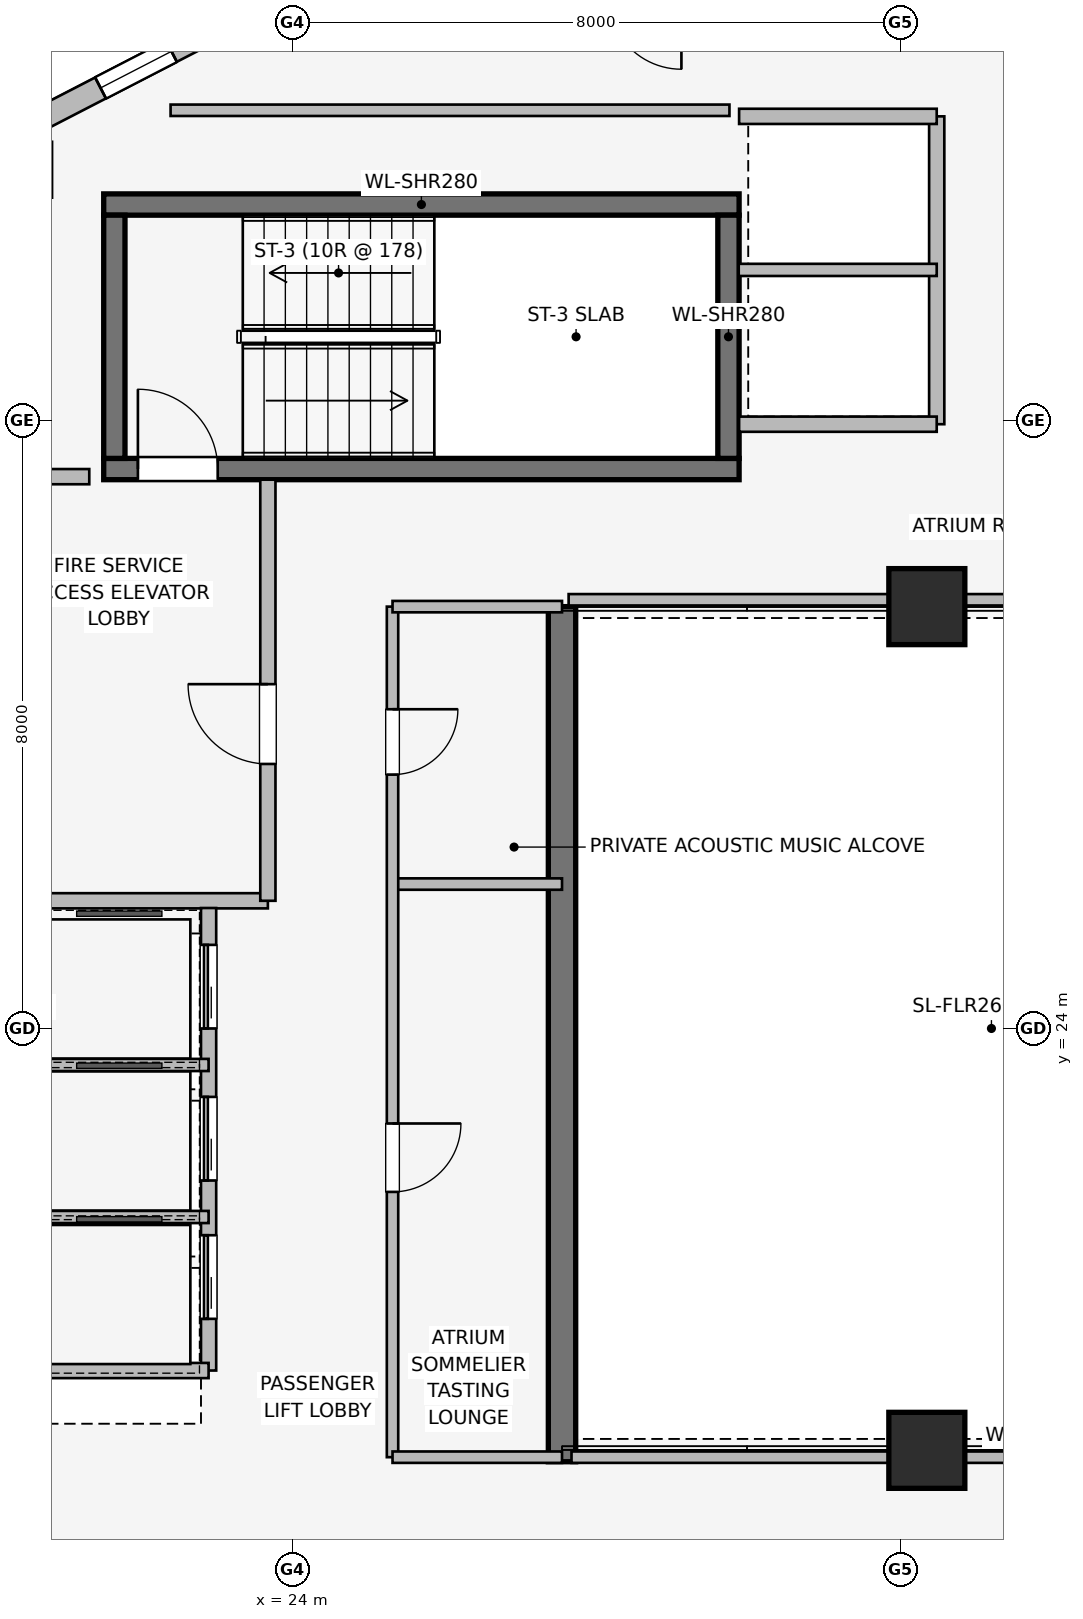
"""IFC4 building model, lengths in metres.
Left out: names, types, materials, properties, quantities, classifications, styles, units other than length and angle.
Written with IfcOpenShell. Run it as: python <this file> out.ifc"""

import sys

from ifc_helpers import new_model, si_unit, direction, frame, frame_2d, origin, origin_2d, place, context, subcontext, project, spatial, rectangle, extrude, element, fill, save


model = new_model("IFC4")
c1 = context("Model", 3, precision=1e-05, world=origin(), true_north=direction((0.0, 1.0)))
c2 = subcontext(c1, "Body", "Model", "MODEL_VIEW")
j1 = project(units=[si_unit("LENGTHUNIT", "METRE"), si_unit("PLANEANGLEUNIT", "RADIAN")], contexts=[c1])
p1 = place(None, origin())
s1 = spatial("IfcSite", under=j1, at=p1, CompositionType="ELEMENT")
p2 = place(p1, origin())
s2 = spatial("IfcBuilding", under=s1, at=p2, CompositionType="ELEMENT")
p3 = place(p2, frame((0.0, 0.0, 252.55)))
s3 = spatial("IfcBuildingStorey", under=s2, at=p3, CompositionType="ELEMENT", Elevation=252.55)
p4 = place(p3, frame((27.55, 29.55, 0.0), z_axis=(0.0, 0.0, 1.0), x_axis=(0.0, -1.0, 0.0)))
e1 = element("IfcWall", 1, at=p4, inside=s3, PredefinedType="SHEAR", context=c2, shape_type="SweptSolid", body=[
    extrude(rectangle(XDim=11.25, YDim=0.36, at=frame_2d((5.625, 0.0))), origin(), (0.0, 0.0, 1.0), 3.55),
])
p5 = place(p3, frame((21.52, 31.36, 0.0), z_axis=(0.0, 0.0, 1.0), x_axis=(1.0, 0.0, 0.0)))
e2 = element("IfcWall", 2, at=p5, inside=s3, PredefinedType="SHEAR", context=c2, shape_type="SweptSolid", body=[
    extrude(rectangle(XDim=8.36, YDim=0.28, at=frame_2d((4.18, 0.0))), origin(), (0.0, 0.0, 1.0), 3.55),
])
p6 = place(p5, frame((0.45, 0.0, 0.0)))
e3 = element("IfcOpeningElement", 3, at=p6, cuts=e2, PredefinedType="OPENING", context=c2, shape_type="SweptSolid", body=[
    extrude(rectangle(XDim=1.05, YDim=2.0, at=frame_2d((0.525, 1.0))), frame((0.0, 0.15, 0.0), z_axis=(0.0, -1.0, 0.0), x_axis=(1.0, 0.0, 0.0)), (0.0, 0.0, 1.0), 0.3),
])
p7 = place(p3, frame((29.88, 34.84, 0.0), z_axis=(0.0, 0.0, 1.0), x_axis=(-1.0, 0.0, 0.0)))
e4 = element("IfcWall", 4, at=p7, inside=s3, PredefinedType="SHEAR", context=c2, shape_type="SweptSolid", body=[
    extrude(rectangle(XDim=8.36, YDim=0.28, at=frame_2d((4.18, 0.0))), origin(), (0.0, 0.0, 1.0), 3.55),
])
for number, where, z_axis, x_axis in (
    (5, (21.66, 34.7, 0.0), (0.0, 0.0, 1.0), (0.0, -1.0, 0.0)),
    (6, (29.74, 31.5, 0.0), (0.0, 0.0, 1.0), (0.0, 1.0, 0.0)),
):
    element("IfcWall", number, at=place(p3, frame(where, z_axis=z_axis, x_axis=x_axis)), inside=s3, PredefinedType="SHEAR", context=c2, shape_type="SweptSolid", body=[
        extrude(rectangle(XDim=3.2, YDim=0.28, at=frame_2d((1.6, 0.0))), origin(), (0.0, 0.0, 1.0), 3.55),
    ])
for number, where, z_axis, x_axis in (
    (7, (32.35, 18.45, 0.0), (0.0, 0.0, 1.0), (1.0, 0.0, 0.0)),
    (8, (32.35, 29.55, 0.0), (0.0, 0.0, 1.0), (1.0, 0.0, 0.0)),
):
    element("IfcColumn", number, at=place(p3, frame(where, z_axis=z_axis, x_axis=x_axis)), inside=s3, PredefinedType="COLUMN", context=c2, shape_type="SweptSolid", body=[
        extrude(rectangle(XDim=1.0, YDim=1.0, at=origin_2d()), origin(), (0.0, 0.0, 1.0), 3.55),
    ])
p8 = place(p3, frame((17.566, 34.354, 0.0), z_axis=(0.0, 0.0, 1.0), x_axis=(0.888581481622, 0.458718814218, 0.0)))
e9 = element("IfcWall", 9, at=p8, inside=s3, PredefinedType="STANDARD", context=c2, shape_type="SweptSolid", body=[
    extrude(rectangle(XDim=15.077, YDim=0.31, at=frame_2d((7.539, 0.0))), origin(), (0.0, 0.0, 1.0), 3.29),
])
p9 = place(p8, frame((0.998, 0.0, 0.75)))
e10 = element("IfcOpeningElement", 10, at=p9, cuts=e9, PredefinedType="OPENING", context=c2, shape_type="SweptSolid", body=[
    extrude(rectangle(XDim=1.05, YDim=1.4, at=frame_2d((0.525, 0.7))), frame((0.0, 0.165, 0.0), z_axis=(0.0, -1.0, 0.0), x_axis=(1.0, 0.0, 0.0)), (0.0, 0.0, 1.0), 0.33),
])
p10 = place(p8, frame((4.403, 0.0, 0.75)))
e11 = element("IfcOpeningElement", 11, at=p10, cuts=e9, PredefinedType="OPENING", context=c2, shape_type="SweptSolid", body=[
    extrude(rectangle(XDim=1.05, YDim=1.4, at=frame_2d((0.525, 0.7))), frame((0.0, 0.165, 0.0), z_axis=(0.0, -1.0, 0.0), x_axis=(1.0, 0.0, 0.0)), (0.0, 0.0, 1.0), 0.33),
])
p11 = place(p8, frame((8.086, 0.0, 0.75)))
e12 = element("IfcOpeningElement", 12, at=p11, cuts=e9, PredefinedType="OPENING", context=c2, shape_type="SweptSolid", body=[
    extrude(rectangle(XDim=2.4, YDim=1.6, at=frame_2d((1.2, 0.8))), frame((0.0, 0.165, 0.0), z_axis=(0.0, -1.0, 0.0), x_axis=(1.0, 0.0, 0.0)), (0.0, 0.0, 1.0), 0.33),
])
p12 = place(p8, frame((13.029, 0.0, 0.75)))
e13 = element("IfcOpeningElement", 13, at=p12, cuts=e9, PredefinedType="OPENING", context=c2, shape_type="SweptSolid", body=[
    extrude(rectangle(XDim=1.05, YDim=1.4, at=frame_2d((0.525, 0.7))), frame((0.0, 0.165, 0.0), z_axis=(0.0, -1.0, 0.0), x_axis=(1.0, 0.0, 0.0)), (0.0, 0.0, 1.0), 0.33),
])
p13 = place(p3, frame((20.793, 25.68, 0.0), z_axis=(0.0, 0.0, 1.0), x_axis=(1.0, 0.0, 0.0)))
e14 = element("IfcWall", 14, at=p13, inside=s3, PredefinedType="PARTITIONING", context=c2, shape_type="SweptSolid", body=[
    extrude(rectangle(XDim=2.887, YDim=0.2, at=frame_2d((1.443, 0.0))), origin(), (0.0, 0.0, 1.0), 3.29),
])
p14 = place(p3, frame((23.68, 25.68, 0.0), z_axis=(0.0, 0.0, 1.0), x_axis=(0.0, 1.0, 0.0)))
e15 = element("IfcWall", 15, at=p14, inside=s3, PredefinedType="PARTITIONING", context=c2, shape_type="SweptSolid", body=[
    extrude(rectangle(XDim=5.54, YDim=0.2, at=frame_2d((2.77, 0.0))), origin(), (0.0, 0.0, 1.0), 3.29),
])
p15 = place(p14, frame((1.8, 0.0, 0.0)))
e16 = element("IfcOpeningElement", 16, at=p15, cuts=e15, PredefinedType="OPENING", context=c2, shape_type="SweptSolid", body=[
    extrude(rectangle(XDim=1.05, YDim=2.0, at=frame_2d((0.525, 1.0))), frame((0.0, 0.11, 0.0), z_axis=(0.0, -1.0, 0.0), x_axis=(1.0, 0.0, 0.0)), (0.0, 0.0, 1.0), 0.22),
])
p16 = place(p3, frame((21.33, 31.26, 0.0), z_axis=(0.0, 0.0, 1.0), x_axis=(-1.0, 0.0, 0.0)))
e17 = element("IfcWall", 17, at=p16, inside=s3, PredefinedType="PARTITIONING", context=c2, shape_type="SweptSolid", body=[
    extrude(rectangle(XDim=1.68, YDim=0.2, at=frame_2d((0.84, 0.0))), origin(), (0.0, 0.0, 1.0), 3.29),
])
p17 = place(p3, frame((32.48, 31.95, 0.0), z_axis=(0.0, 0.0, 1.0), x_axis=(0.0, 1.0, 0.0)))
e18 = element("IfcWall", 18, at=p17, inside=s3, PredefinedType="PARTITIONING", context=c2, shape_type="SweptSolid", body=[
    extrude(rectangle(XDim=4.05, YDim=0.2, at=frame_2d((2.025, 0.0))), origin(), (0.0, 0.0, 1.0), 3.29),
])
for number, where, z_axis, x_axis in (
    (19, (29.88, 36.0, 0.0), (0.0, 0.0, 1.0), (1.0, 0.0, 0.0)),
    (20, (32.48, 31.95, 0.0), (0.0, 0.0, 1.0), (-1.0, 0.0, 0.0)),
):
    element("IfcWall", number, at=place(p3, frame(where, z_axis=z_axis, x_axis=x_axis)), inside=s3, PredefinedType="PARTITIONING", context=c2, shape_type="SweptSolid", body=[
        extrude(rectangle(XDim=2.6, YDim=0.2, at=frame_2d((1.3, 0.0))), origin(), (0.0, 0.0, 1.0), 3.29),
    ])
p18 = place(p3, frame((29.875, 33.98, 0.0), z_axis=(0.0, 0.0, 1.0), x_axis=(1.0, 0.0, 0.0)))
e21 = element("IfcWall", 21, at=p18, inside=s3, PredefinedType="PARTITIONING", context=c2, shape_type="SweptSolid", body=[
    extrude(rectangle(XDim=2.605, YDim=0.16, at=frame_2d((1.302, 0.0))), origin(), (0.0, 0.0, 1.0), 3.29),
])
p19 = place(p3, frame((22.9, 19.5, 0.0), z_axis=(0.0, 0.0, 1.0), x_axis=(0.0, 1.0, 0.0)))
e22 = element("IfcWall", 22, at=p19, inside=s3, PredefinedType="PARTITIONING", context=c2, shape_type="SweptSolid", body=[
    extrude(rectangle(XDim=6.085, YDim=0.2, at=frame_2d((3.042, 0.0))), origin(), (0.0, 0.0, 1.0), 3.29),
])
p20 = place(p19, frame((0.68, 0.0, 0.0)))
e23 = element("IfcOpeningElement", 23, at=p20, cuts=e22, PredefinedType="OPENING", context=c2, shape_type="SweptSolid", body=[
    extrude(rectangle(XDim=1.1, YDim=2.2, at=frame_2d((0.55, 1.1))), frame((0.0, 0.11, 0.0), z_axis=(0.0, -1.0, 0.0), x_axis=(1.0, 0.0, 0.0)), (0.0, 0.0, 1.0), 0.22),
])
p21 = place(p19, frame((2.5, 0.0, 0.0)))
e24 = element("IfcOpeningElement", 24, at=p21, cuts=e22, PredefinedType="OPENING", context=c2, shape_type="SweptSolid", body=[
    extrude(rectangle(XDim=1.1, YDim=2.2, at=frame_2d((0.55, 1.1))), frame((0.0, 0.11, 0.0), z_axis=(0.0, -1.0, 0.0), x_axis=(1.0, 0.0, 0.0)), (0.0, 0.0, 1.0), 0.22),
])
p22 = place(p19, frame((4.5, 0.0, 0.0)))
e25 = element("IfcOpeningElement", 25, at=p22, cuts=e22, PredefinedType="OPENING", context=c2, shape_type="SweptSolid", body=[
    extrude(rectangle(XDim=1.1, YDim=2.2, at=frame_2d((0.55, 1.1))), frame((0.0, 0.11, 0.0), z_axis=(0.0, -1.0, 0.0), x_axis=(1.0, 0.0, 0.0)), (0.0, 0.0, 1.0), 0.22),
])
p23 = place(p3, frame((20.49, 19.5, 0.0), z_axis=(0.0, 0.0, 1.0), x_axis=(1.0, 0.0, 0.0)))
e26 = element("IfcWall", 26, at=p23, inside=s3, PredefinedType="PARTITIONING", context=c2, shape_type="SweptSolid", body=[
    extrude(rectangle(XDim=2.41, YDim=0.2, at=frame_2d((1.205, 0.0))), origin(), (0.0, 0.0, 1.0), 2.19),
])
for number, where, z_axis, x_axis in (
    (27, (20.55, 21.52, 0.0), (0.0, 0.0, 1.0), (1.0, 0.0, 0.0)),
    (28, (20.55, 23.52, 0.0), (0.0, 0.0, 1.0), (1.0, 0.0, 0.0)),
):
    element("IfcWall", number, at=place(p3, frame(where, z_axis=z_axis, x_axis=x_axis)), inside=s3, PredefinedType="PARTITIONING", context=c2, shape_type="SweptSolid", body=[
        extrude(rectangle(XDim=2.35, YDim=0.16, at=frame_2d((1.175, 0.0))), origin(), (0.0, 0.0, 1.0), 3.29),
    ])
p24 = place(p3, frame((25.32, 25.9, 0.0), z_axis=(0.0, 0.0, 1.0), x_axis=(1.0, 0.0, 0.0)))
e29 = element("IfcWall", 29, at=p24, inside=s3, PredefinedType="PARTITIONING", context=c2, shape_type="SweptSolid", body=[
    extrude(rectangle(XDim=2.23, YDim=0.15, at=frame_2d((1.115, 0.0))), origin(), (0.0, 0.0, 1.0), 3.29),
])
p25 = place(p3, frame((25.32, 29.55, 0.0), z_axis=(0.0, 0.0, 1.0), x_axis=(0.0, -1.0, 0.0)))
e30 = element("IfcWall", 30, at=p25, inside=s3, PredefinedType="PARTITIONING", context=c2, shape_type="SweptSolid", body=[
    extrude(rectangle(XDim=11.19, YDim=0.15, at=frame_2d((5.595, 0.0))), origin(), (0.0, 0.0, 1.0), 3.29),
])
p26 = place(p25, frame((1.35, 0.0, 0.0)))
e31 = element("IfcOpeningElement", 31, at=p26, cuts=e30, PredefinedType="OPENING", context=c2, shape_type="SweptSolid", body=[
    extrude(rectangle(XDim=0.86, YDim=2.0, at=frame_2d((0.43, 1.0))), frame((0.0, 0.085, 0.0), z_axis=(0.0, -1.0, 0.0), x_axis=(1.0, 0.0, 0.0)), (0.0, 0.0, 1.0), 0.17),
])
p27 = place(p25, frame((6.8, 0.0, 0.0)))
e32 = element("IfcOpeningElement", 32, at=p27, cuts=e30, PredefinedType="OPENING", context=c2, shape_type="SweptSolid", body=[
    extrude(rectangle(XDim=0.9, YDim=2.0, at=frame_2d((0.45, 1.0))), frame((0.0, 0.085, 0.0), z_axis=(0.0, -1.0, 0.0), x_axis=(1.0, 0.0, 0.0)), (0.0, 0.0, 1.0), 0.17),
])
p28 = place(p3, frame((25.32, 18.36, 0.0), z_axis=(0.0, 0.0, 1.0), x_axis=(1.0, 0.0, 0.0)))
e33 = element("IfcWall", 33, at=p28, inside=s3, PredefinedType="PARTITIONING", context=c2, shape_type="SweptSolid", body=[
    extrude(rectangle(XDim=2.23, YDim=0.15, at=frame_2d((1.115, 0.0))), origin(), (0.0, 0.0, 1.0), 3.29),
])
p29 = place(p3, frame((27.55, 29.55, 0.0), z_axis=(0.0, 0.0, 1.0), x_axis=(-1.0, 0.0, 0.0)))
e34 = element("IfcWall", 34, at=p29, inside=s3, PredefinedType="PARTITIONING", context=c2, shape_type="SweptSolid", body=[
    extrude(rectangle(XDim=2.23, YDim=0.15, at=frame_2d((1.115, 0.0))), origin(), (0.0, 0.0, 1.0), 2.19),
])
p30 = place(p3, frame((27.675, 18.36, 0.0), z_axis=(0.0, 0.0, 1.0), x_axis=(1.0, 0.0, 0.0)))
e35 = element("IfcWall", 35, at=p30, inside=s3, PredefinedType="PARTITIONING", context=c2, shape_type="SweptSolid", body=[
    extrude(rectangle(XDim=12.165, YDim=0.15, at=frame_2d((6.083, 0.0))), origin(), (0.0, 0.0, 1.0), 2.431),
])
p31 = place(p3, frame((39.84, 29.64, 0.0), z_axis=(0.0, 0.0, 1.0), x_axis=(-1.0, 0.0, 0.0)))
e36 = element("IfcWall", 36, at=p31, inside=s3, PredefinedType="PARTITIONING", context=c2, shape_type="SweptSolid", body=[
    extrude(rectangle(XDim=12.203, YDim=0.15, at=frame_2d((6.102, 0.0))), origin(), (0.0, 0.0, 1.0), 2.431),
])
p32 = place(p3, frame((29.753, 36.08, 0.0), z_axis=(0.0, 0.0, 1.0), x_axis=(-1.0, 0.0, 0.0)))
e37 = element("IfcWall", 37, at=p32, inside=s3, PredefinedType="PARTITIONING", context=c2, shape_type="SweptSolid", body=[
    extrude(rectangle(XDim=7.353, YDim=0.15, at=frame_2d((3.677, 0.0))), origin(), (0.0, 0.0, 1.0), 2.682),
])
p33 = place(p10, origin())
e38 = element("IfcWindow", 38, at=p33, inside=s3, PartitioningType="SINGLE_PANEL", PredefinedType="WINDOW", context=c2, shape_type="SweptSolid", body=[
    extrude(rectangle(XDim=1.05, YDim=1.4, at=frame_2d((0.525, 0.7))), frame((0.0, 0.03, 0.0), z_axis=(0.0, -1.0, 0.0), x_axis=(1.0, 0.0, 0.0)), (0.0, 0.0, 1.0), 0.06),
])
fill(e11, e38)
p34 = place(p6, origin())
e39 = element("IfcDoor", 39, at=p34, inside=s3, OperationType="SINGLE_SWING_LEFT", PredefinedType="DOOR", context=c2, shape_type="SweptSolid", body=[
    extrude(rectangle(XDim=1.05, YDim=2.0, at=frame_2d((0.525, 1.0))), frame((0.0, 0.025, 0.0), z_axis=(0.0, -1.0, 0.0), x_axis=(1.0, 0.0, 0.0)), (0.0, 0.0, 1.0), 0.05),
])
fill(e3, e39)
p35 = place(p15, origin())
e40 = element("IfcDoor", 40, at=p35, inside=s3, OperationType="SINGLE_SWING_RIGHT", PredefinedType="DOOR", context=c2, shape_type="SweptSolid", body=[
    extrude(rectangle(XDim=1.05, YDim=2.0, at=frame_2d((0.525, 1.0))), frame((0.0, 0.025, 0.0), z_axis=(0.0, -1.0, 0.0), x_axis=(1.0, 0.0, 0.0)), (0.0, 0.0, 1.0), 0.05),
])
fill(e16, e40)
p36 = place(p20, origin())
e41 = element("IfcDoor", 41, at=p36, inside=s3, OperationType="SLIDING_TO_LEFT", PredefinedType="DOOR", context=c2, shape_type="SweptSolid", body=[
    extrude(rectangle(XDim=1.1, YDim=2.2, at=frame_2d((0.55, 1.1))), frame((0.0, 0.025, 0.0), z_axis=(0.0, -1.0, 0.0), x_axis=(1.0, 0.0, 0.0)), (0.0, 0.0, 1.0), 0.05),
])
fill(e23, e41)
p37 = place(p21, origin())
e42 = element("IfcDoor", 42, at=p37, inside=s3, OperationType="SLIDING_TO_LEFT", PredefinedType="DOOR", context=c2, shape_type="SweptSolid", body=[
    extrude(rectangle(XDim=1.1, YDim=2.2, at=frame_2d((0.55, 1.1))), frame((0.0, 0.025, 0.0), z_axis=(0.0, -1.0, 0.0), x_axis=(1.0, 0.0, 0.0)), (0.0, 0.0, 1.0), 0.05),
])
fill(e24, e42)
p38 = place(p22, origin())
e43 = element("IfcDoor", 43, at=p38, inside=s3, OperationType="SLIDING_TO_LEFT", PredefinedType="DOOR", context=c2, shape_type="SweptSolid", body=[
    extrude(rectangle(XDim=1.1, YDim=2.2, at=frame_2d((0.55, 1.1))), frame((0.0, 0.025, 0.0), z_axis=(0.0, -1.0, 0.0), x_axis=(1.0, 0.0, 0.0)), (0.0, 0.0, 1.0), 0.05),
])
fill(e25, e43)
p39 = place(p26, origin())
e44 = element("IfcDoor", 44, at=p39, inside=s3, OperationType="SINGLE_SWING_LEFT", PredefinedType="DOOR", context=c2, shape_type="SweptSolid", body=[
    extrude(rectangle(XDim=0.86, YDim=2.0, at=frame_2d((0.43, 1.0))), frame((0.0, 0.025, 0.0), z_axis=(0.0, -1.0, 0.0), x_axis=(1.0, 0.0, 0.0)), (0.0, 0.0, 1.0), 0.05),
])
fill(e31, e44)
p40 = place(p27, origin())
e45 = element("IfcDoor", 45, at=p40, inside=s3, OperationType="SINGLE_SWING_LEFT", PredefinedType="DOOR", context=c2, shape_type="SweptSolid", body=[
    extrude(rectangle(XDim=0.9, YDim=2.0, at=frame_2d((0.45, 1.0))), frame((0.0, 0.025, 0.0), z_axis=(0.0, -1.0, 0.0), x_axis=(1.0, 0.0, 0.0)), (0.0, 0.0, 1.0), 0.05),
])
fill(e32, e45)
save(model, sys.argv[1])
